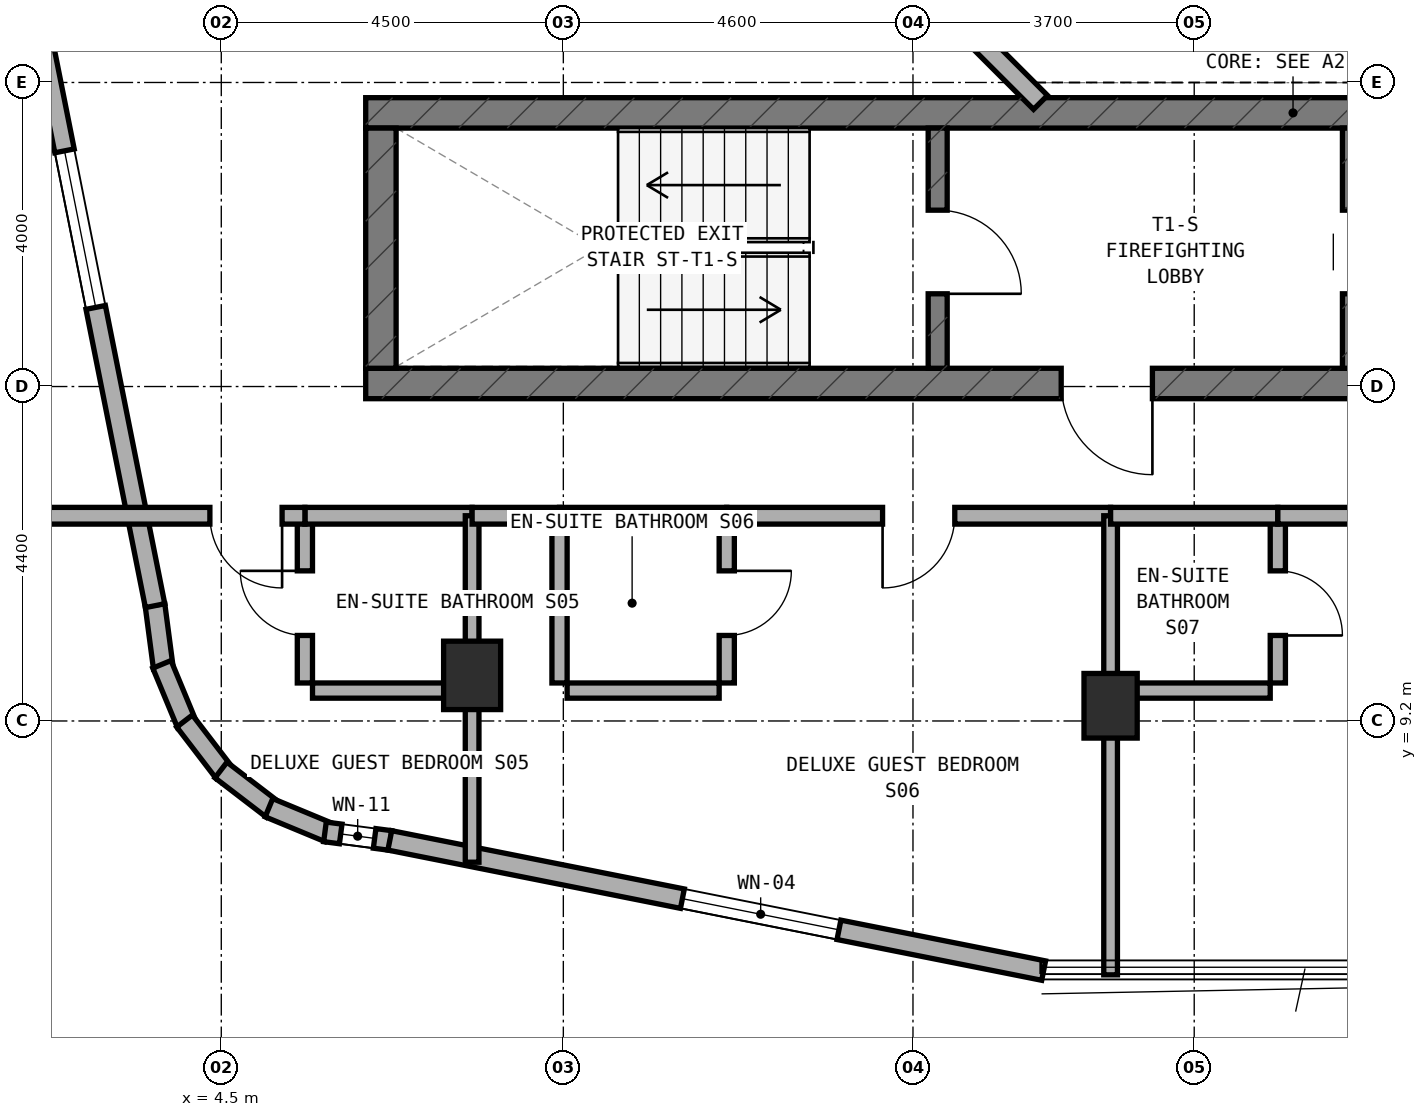
"""IFC4 building model, lengths in metres.
Left out: names, types, materials, properties, quantities, classifications, styles, units other than length and angle.
Written with IfcOpenShell. Run it as: python <this file> out.ifc"""

import sys

from ifc_helpers import new_model, si_unit, direction, frame, frame_2d, origin, origin_2d, place, context, subcontext, project, spatial, rectangle, extrude, element, fill, save


model = new_model("IFC4")
c1 = context("Model", 3, precision=1e-05, world=origin(), true_north=direction((0.0, 1.0)))
c2 = subcontext(c1, "Body", "Model", "MODEL_VIEW")
j1 = project(units=[si_unit("LENGTHUNIT", "METRE"), si_unit("PLANEANGLEUNIT", "RADIAN")], contexts=[c1])
p1 = place(None, origin())
s1 = spatial("IfcSite", under=j1, at=p1, CompositionType="ELEMENT")
p2 = place(p1, origin())
s2 = spatial("IfcBuilding", under=s1, at=p2, CompositionType="ELEMENT")
p3 = place(p2, frame((0.0, 0.0, 224.3)))
s3 = spatial("IfcBuildingStorey", under=s2, at=p3, CompositionType="ELEMENT", Elevation=224.3)
p4 = place(p3, frame((6.4, 13.64, 0.0), z_axis=(0.0, 0.0, 1.0), x_axis=(1.0, 0.0, 0.0)))
e1 = element("IfcWall", 1, at=p4, inside=s3, PredefinedType="SHEAR", context=c2, shape_type="SweptSolid", body=[
    extrude(rectangle(XDim=24.4, YDim=0.4, at=frame_2d((12.2, 0.0))), origin(), (0.0, 0.0, 1.0), 3.6),
])
p5 = place(p4, frame((9.15, 0.0, 0.0)))
e2 = element("IfcOpeningElement", 2, at=p5, cuts=e1, PredefinedType="OPENING", context=c2, shape_type="SweptSolid", body=[
    extrude(rectangle(XDim=1.2, YDim=2.15, at=frame_2d((0.6, 1.075))), frame((0.0, 0.21, 0.0), z_axis=(0.0, -1.0, 0.0), x_axis=(1.0, 0.0, 0.0)), (0.0, 0.0, 1.0), 0.42),
])
p6 = place(p4, frame((16.94, 0.0, 0.0)))
e3 = element("IfcOpeningElement", 3, at=p6, cuts=e1, PredefinedType="OPENING", context=c2, shape_type="SweptSolid", body=[
    extrude(rectangle(XDim=0.85, YDim=2.1, at=frame_2d((0.425, 1.05))), frame((0.0, 0.21, 0.0), z_axis=(0.0, -1.0, 0.0), x_axis=(1.0, 0.0, 0.0)), (0.0, 0.0, 1.0), 0.42),
])
p7 = place(p4, frame((18.783, 0.0, 0.0)))
e4 = element("IfcOpeningElement", 4, at=p7, cuts=e1, PredefinedType="OPENING", context=c2, shape_type="SweptSolid", body=[
    extrude(rectangle(XDim=1.1, YDim=2.15, at=frame_2d((0.55, 1.075))), frame((0.0, 0.21, 0.0), z_axis=(0.0, -1.0, 0.0), x_axis=(1.0, 0.0, 0.0)), (0.0, 0.0, 1.0), 0.42),
])
p8 = place(p4, frame((20.65, 0.0, 0.0)))
e5 = element("IfcOpeningElement", 5, at=p8, cuts=e1, PredefinedType="OPENING", context=c2, shape_type="SweptSolid", body=[
    extrude(rectangle(XDim=1.1, YDim=2.15, at=frame_2d((0.55, 1.075))), frame((0.0, 0.21, 0.0), z_axis=(0.0, -1.0, 0.0), x_axis=(1.0, 0.0, 0.0)), (0.0, 0.0, 1.0), 0.42),
])
p9 = place(p4, frame((22.517, 0.0, 0.0)))
e6 = element("IfcOpeningElement", 6, at=p9, cuts=e1, PredefinedType="OPENING", context=c2, shape_type="SweptSolid", body=[
    extrude(rectangle(XDim=1.1, YDim=2.15, at=frame_2d((0.55, 1.075))), frame((0.0, 0.21, 0.0), z_axis=(0.0, -1.0, 0.0), x_axis=(1.0, 0.0, 0.0)), (0.0, 0.0, 1.0), 0.42),
])
p10 = place(p3, frame((6.4, 17.2, 0.0), z_axis=(0.0, 0.0, 1.0), x_axis=(1.0, 0.0, 0.0)))
e7 = element("IfcWall", 7, at=p10, inside=s3, PredefinedType="SHEAR", context=c2, shape_type="SweptSolid", body=[
    extrude(rectangle(XDim=24.4, YDim=0.4, at=frame_2d((12.2, 0.0))), origin(), (0.0, 0.0, 1.0), 3.6),
])
p11 = place(p3, frame((6.6, 13.84, 0.0), z_axis=(0.0, 0.0, 1.0), x_axis=(0.0, 1.0, 0.0)))
e8 = element("IfcWall", 8, at=p11, inside=s3, PredefinedType="SHEAR", context=c2, shape_type="SweptSolid", body=[
    extrude(rectangle(XDim=3.16, YDim=0.4, at=frame_2d((1.58, 0.0))), origin(), (0.0, 0.0, 1.0), 3.6),
])
p12 = place(p3, frame((13.925, 13.84, 0.0), z_axis=(0.0, 0.0, 1.0), x_axis=(0.0, 1.0, 0.0)))
e9 = element("IfcWall", 9, at=p12, inside=s3, PredefinedType="STANDARD", context=c2, shape_type="SweptSolid", body=[
    extrude(rectangle(XDim=3.16, YDim=0.25, at=frame_2d((1.58, 0.0))), origin(), (0.0, 0.0, 1.0), 3.32),
])
p13 = place(p12, frame((0.98, 0.0, 0.0)))
e10 = element("IfcOpeningElement", 10, at=p13, cuts=e9, PredefinedType="OPENING", context=c2, shape_type="SweptSolid", body=[
    extrude(rectangle(XDim=1.1, YDim=2.15, at=frame_2d((0.55, 1.075))), frame((0.0, 0.135, 0.0), z_axis=(0.0, -1.0, 0.0), x_axis=(1.0, 0.0, 0.0)), (0.0, 0.0, 1.0), 0.27),
])
p14 = place(p3, frame((19.375, 13.84, 0.0), z_axis=(0.0, 0.0, 1.0), x_axis=(0.0, 1.0, 0.0)))
e11 = element("IfcWall", 11, at=p14, inside=s3, PredefinedType="STANDARD", context=c2, shape_type="SweptSolid", body=[
    extrude(rectangle(XDim=3.16, YDim=0.25, at=frame_2d((1.58, 0.0))), origin(), (0.0, 0.0, 1.0), 3.32),
])
p15 = place(p14, frame((0.98, 0.0, 0.0)))
e12 = element("IfcOpeningElement", 12, at=p15, cuts=e11, PredefinedType="OPENING", context=c2, shape_type="SweptSolid", body=[
    extrude(rectangle(XDim=1.1, YDim=2.15, at=frame_2d((0.55, 1.075))), frame((0.0, 0.135, 0.0), z_axis=(0.0, -1.0, 0.0), x_axis=(1.0, 0.0, 0.0)), (0.0, 0.0, 1.0), 0.27),
])
p16 = place(p3, frame((16.2, 9.4, 0.0), z_axis=(0.0, 0.0, 1.0), x_axis=(1.0, 0.0, 0.0)))
e13 = element("IfcColumn", 13, at=p16, inside=s3, PredefinedType="COLUMN", context=c2, shape_type="SweptSolid", body=[
    extrude(rectangle(XDim=0.7, YDim=0.85, at=origin_2d()), origin(), (0.0, 0.0, 1.0), 3.6),
])
p17 = place(p3, frame((7.8, 9.8, 0.0), z_axis=(0.0, 0.0, 1.0), x_axis=(1.0, 0.0, 0.0)))
e14 = element("IfcColumn", 14, at=p17, inside=s3, PredefinedType="COLUMN", context=c2, shape_type="SweptSolid", body=[
    extrude(rectangle(XDim=0.75, YDim=0.9, at=origin_2d()), origin(), (0.0, 0.0, 1.0), 3.6),
])
p18 = place(p3, frame((3.628, 10.725, 0.0), z_axis=(0.0, 0.0, 1.0), x_axis=(0.130954667764, -0.9913883573, 0.0)))
e15 = element("IfcWall", 15, at=p18, inside=s3, PredefinedType="STANDARD", context=c2, shape_type="SweptSolid", body=[
    extrude(rectangle(XDim=0.833, YDim=0.26, at=frame_2d((0.417, 0.0))), origin(), (0.0, 0.0, 1.0), 3.32),
])
p19 = place(p3, frame((3.719, 9.945, 0.0), z_axis=(0.0, 0.0, 1.0), x_axis=(0.382985169477, -0.923754491172, 0.0)))
e16 = element("IfcWall", 16, at=p19, inside=s3, PredefinedType="STANDARD", context=c2, shape_type="SweptSolid", body=[
    extrude(rectangle(XDim=0.851, YDim=0.26, at=frame_2d((0.426, 0.0))), origin(), (0.0, 0.0, 1.0), 3.32),
])
for number, where, z_axis, x_axis in (
    (17, (4.017, 9.199, 0.0), (0.0, 0.0, 1.0), (0.608, -0.794, 0.0)),
    (18, (4.496, 8.555, 0.0), (0.0, 0.0, 1.0), (0.794, -0.608, 0.0)),
):
    element("IfcWall", number, at=place(p3, frame(where, z_axis=z_axis, x_axis=x_axis)), inside=s3, PredefinedType="STANDARD", context=c2, shape_type="SweptSolid", body=[
        extrude(rectangle(XDim=0.85, YDim=0.26, at=frame_2d((0.425, 0.0))), origin(), (0.0, 0.0, 1.0), 3.32),
    ])
p20 = place(p3, frame((5.127, 8.059, 0.0), z_axis=(0.0, 0.0, 1.0), x_axis=(0.923652976167, -0.383229930484, 0.0)))
e19 = element("IfcWall", 19, at=p20, inside=s3, PredefinedType="STANDARD", context=c2, shape_type="SweptSolid", body=[
    extrude(rectangle(XDim=0.851, YDim=0.26, at=frame_2d((0.426, 0.0))), origin(), (0.0, 0.0, 1.0), 3.32),
])
p21 = place(p3, frame((5.864, 7.741, 0.0), z_axis=(0.0, 0.0, 1.0), x_axis=(0.991493480548, -0.130156359936, 0.0)))
e20 = element("IfcWall", 20, at=p21, inside=s3, PredefinedType="STANDARD", context=c2, shape_type="SweptSolid", body=[
    extrude(rectangle(XDim=0.868, YDim=0.26, at=frame_2d((0.434, 0.0))), origin(), (0.0, 0.0, 1.0), 3.32),
])
p22 = place(p21, frame((0.209, 0.0, 0.85)))
e21 = element("IfcOpeningElement", 21, at=p22, cuts=e20, PredefinedType="OPENING", context=c2, shape_type="SweptSolid", body=[
    extrude(rectangle(XDim=0.45, YDim=1.5, at=frame_2d((0.225, 0.75))), frame((0.0, 0.14, 0.0), z_axis=(0.0, -1.0, 0.0), x_axis=(1.0, 0.0, 0.0)), (0.0, 0.0, 1.0), 0.28),
])
p23 = place(p3, frame((6.717, 7.629, 0.0), z_axis=(0.0, 0.0, 1.0), x_axis=(0.980745199176, -0.195291715883, 0.0)))
e22 = element("IfcWall", 22, at=p23, inside=s3, PredefinedType="STANDARD", context=c2, shape_type="SweptSolid", body=[
    extrude(rectangle(XDim=8.771, YDim=0.26, at=frame_2d((4.385, 0.0))), origin(), (0.0, 0.0, 1.0), 3.32),
])
p24 = place(p23, frame((3.925, 0.0, 0.85)))
e23 = element("IfcOpeningElement", 23, at=p24, cuts=e22, PredefinedType="OPENING", context=c2, shape_type="SweptSolid", body=[
    extrude(rectangle(XDim=2.1, YDim=1.5, at=frame_2d((1.05, 0.75))), frame((0.0, 0.14, 0.0), z_axis=(0.0, -1.0, 0.0), x_axis=(1.0, 0.0, 0.0)), (0.0, 0.0, 1.0), 0.28),
])
p25 = place(p3, frame((1.916, 19.319, 0.0), z_axis=(0.0, 0.0, 1.0), x_axis=(0.195291715883, -0.980745199176, 0.0)))
e24 = element("IfcWall", 24, at=p25, inside=s3, PredefinedType="STANDARD", context=c2, shape_type="SweptSolid", body=[
    extrude(rectangle(XDim=8.771, YDim=0.26, at=frame_2d((4.385, 0.0))), origin(), (0.0, 0.0, 1.0), 3.32),
])
p26 = place(p25, frame((2.67, 0.0, 0.85)))
e25 = element("IfcOpeningElement", 25, at=p26, cuts=e24, PredefinedType="OPENING", context=c2, shape_type="SweptSolid", body=[
    extrude(rectangle(XDim=2.1, YDim=1.5, at=frame_2d((1.05, 0.75))), frame((0.0, 0.14, 0.0), z_axis=(0.0, -1.0, 0.0), x_axis=(1.0, 0.0, 0.0)), (0.0, 0.0, 1.0), 0.28),
])
p27 = place(p3, frame((13.444, 19.172, 0.0), z_axis=(0.0, 0.0, 1.0), x_axis=(0.707059717605, -0.707153841636, 0.0)))
e26 = element("IfcWall", 26, at=p27, inside=s3, PredefinedType="STANDARD", context=c2, shape_type="SweptSolid", body=[
    extrude(rectangle(XDim=2.594, YDim=0.26, at=frame_2d((1.297, 0.0))), origin(), (0.0, 0.0, 1.0), 3.32),
])
p28 = place(p3, frame((5.6, 9.7, 0.0), z_axis=(0.0, 0.0, 1.0), x_axis=(0.0, 1.0, 0.0)))
e27 = element("IfcWall", 27, at=p28, inside=s3, PredefinedType="PLUMBINGWALL", context=c2, shape_type="SweptSolid", body=[
    extrude(rectangle(XDim=2.1, YDim=0.2, at=frame_2d((1.05, 0.0))), origin(), (0.0, 0.0, 1.0), 3.32),
])
p29 = place(p28, frame((0.625, 0.0, 0.0)))
e28 = element("IfcOpeningElement", 28, at=p29, cuts=e27, PredefinedType="OPENING", context=c2, shape_type="SweptSolid", body=[
    extrude(rectangle(XDim=0.85, YDim=2.1, at=frame_2d((0.425, 1.05))), frame((0.0, 0.11, 0.0), z_axis=(0.0, -1.0, 0.0), x_axis=(1.0, 0.0, 0.0)), (0.0, 0.0, 1.0), 0.22),
])
p30 = place(p3, frame((5.7, 9.6, 0.0), z_axis=(0.0, 0.0, 1.0), x_axis=(1.0, 0.0, 0.0)))
e29 = element("IfcWall", 29, at=p30, inside=s3, PredefinedType="PLUMBINGWALL", context=c2, shape_type="SweptSolid", body=[
    extrude(rectangle(XDim=2.0, YDim=0.2, at=frame_2d((1.0, 0.0))), origin(), (0.0, 0.0, 1.0), 3.32),
])
p31 = place(p3, frame((5.6, 11.9, 0.0), z_axis=(0.0, 0.0, 1.0), x_axis=(1.0, 0.0, 0.0)))
e30 = element("IfcWall", 30, at=p31, inside=s3, PredefinedType="SOLIDWALL", context=c2, shape_type="SweptSolid", body=[
    extrude(rectangle(XDim=2.2, YDim=0.22, at=frame_2d((1.1, 0.0))), origin(), (0.0, 0.0, 1.0), 2.695),
])
p32 = place(p3, frame((1.96, 11.9, 0.0), z_axis=(0.0, 0.0, 1.0), x_axis=(1.0, 0.0, 0.0)))
e31 = element("IfcWall", 31, at=p32, inside=s3, PredefinedType="SOLIDWALL", context=c2, shape_type="SweptSolid", body=[
    extrude(rectangle(XDim=3.64, YDim=0.22, at=frame_2d((1.82, 0.0))), origin(), (0.0, 0.0, 1.0), 3.32),
])
p33 = place(p32, frame((2.39, 0.0, 0.0)))
e32 = element("IfcOpeningElement", 32, at=p33, cuts=e31, PredefinedType="OPENING", context=c2, shape_type="SweptSolid", body=[
    extrude(rectangle(XDim=0.95, YDim=2.1, at=frame_2d((0.475, 1.05))), frame((0.0, 0.12, 0.0), z_axis=(0.0, -1.0, 0.0), x_axis=(1.0, 0.0, 0.0)), (0.0, 0.0, 1.0), 0.24),
])
p34 = place(p3, frame((7.8, 7.342, 0.0), z_axis=(0.0, 0.0, 1.0), x_axis=(0.0, 1.0, 0.0)))
e33 = element("IfcWall", 33, at=p34, inside=s3, PredefinedType="SOLIDWALL", context=c2, shape_type="SweptSolid", body=[
    extrude(rectangle(XDim=4.558, YDim=0.18, at=frame_2d((2.279, 0.0))), origin(), (0.0, 0.0, 1.0), 2.695),
])
p35 = place(p3, frame((11.15, 9.7, 0.0), z_axis=(0.0, 0.0, 1.0), x_axis=(0.0, 1.0, 0.0)))
e34 = element("IfcWall", 34, at=p35, inside=s3, PredefinedType="PLUMBINGWALL", context=c2, shape_type="SweptSolid", body=[
    extrude(rectangle(XDim=2.1, YDim=0.2, at=frame_2d((1.05, 0.0))), origin(), (0.0, 0.0, 1.0), 3.015),
])
p36 = place(p35, frame((0.625, 0.0, 0.0)))
e35 = element("IfcOpeningElement", 35, at=p36, cuts=e34, PredefinedType="OPENING", context=c2, shape_type="SweptSolid", body=[
    extrude(rectangle(XDim=0.85, YDim=2.1, at=frame_2d((0.425, 1.05))), frame((0.0, 0.11, 0.0), z_axis=(0.0, -1.0, 0.0), x_axis=(1.0, 0.0, 0.0)), (0.0, 0.0, 1.0), 0.22),
])
p37 = place(p3, frame((9.05, 9.6, 0.0), z_axis=(0.0, 0.0, 1.0), x_axis=(1.0, 0.0, 0.0)))
e36 = element("IfcWall", 36, at=p37, inside=s3, PredefinedType="PLUMBINGWALL", context=c2, shape_type="SweptSolid", body=[
    extrude(rectangle(XDim=2.0, YDim=0.2, at=frame_2d((1.0, 0.0))), origin(), (0.0, 0.0, 1.0), 3.015),
])
p38 = place(p3, frame((8.95, 9.7, 0.0), z_axis=(0.0, 0.0, 1.0), x_axis=(0.0, 1.0, 0.0)))
e37 = element("IfcWall", 37, at=p38, inside=s3, PredefinedType="PLUMBINGWALL", context=c2, shape_type="SweptSolid", body=[
    extrude(rectangle(XDim=2.1, YDim=0.2, at=frame_2d((1.05, 0.0))), origin(), (0.0, 0.0, 1.0), 3.015),
])
p39 = place(p3, frame((7.8, 11.9, 0.0), z_axis=(0.0, 0.0, 1.0), x_axis=(1.0, 0.0, 0.0)))
e38 = element("IfcWall", 38, at=p39, inside=s3, PredefinedType="SOLIDWALL", context=c2, shape_type="SweptSolid", body=[
    extrude(rectangle(XDim=1.15, YDim=0.22, at=frame_2d((0.575, 0.0))), origin(), (0.0, 0.0, 1.0), 2.695),
])
p40 = place(p3, frame((8.95, 11.9, 0.0), z_axis=(0.0, 0.0, 1.0), x_axis=(1.0, 0.0, 0.0)))
e39 = element("IfcWall", 39, at=p40, inside=s3, PredefinedType="SOLIDWALL", context=c2, shape_type="SweptSolid", body=[
    extrude(rectangle(XDim=2.2, YDim=0.22, at=frame_2d((1.1, 0.0))), origin(), (0.0, 0.0, 1.0), 3.32),
])
p41 = place(p3, frame((11.15, 11.9, 0.0), z_axis=(0.0, 0.0, 1.0), x_axis=(1.0, 0.0, 0.0)))
e40 = element("IfcWall", 40, at=p41, inside=s3, PredefinedType="SOLIDWALL", context=c2, shape_type="SweptSolid", body=[
    extrude(rectangle(XDim=5.05, YDim=0.22, at=frame_2d((2.525, 0.0))), origin(), (0.0, 0.0, 1.0), 2.695),
])
p42 = place(p41, frame((2.05, 0.0, 0.0)))
e41 = element("IfcOpeningElement", 41, at=p42, cuts=e40, PredefinedType="OPENING", context=c2, shape_type="SweptSolid", body=[
    extrude(rectangle(XDim=0.95, YDim=2.1, at=frame_2d((0.475, 1.05))), frame((0.0, 0.12, 0.0), z_axis=(0.0, -1.0, 0.0), x_axis=(1.0, 0.0, 0.0)), (0.0, 0.0, 1.0), 0.24),
])
p43 = place(p3, frame((16.2, 5.86, 0.0), z_axis=(0.0, 0.0, 1.0), x_axis=(0.0, 1.0, 0.0)))
e42 = element("IfcWall", 42, at=p43, inside=s3, PredefinedType="SOLIDWALL", context=c2, shape_type="SweptSolid", body=[
    extrude(rectangle(XDim=6.04, YDim=0.18, at=frame_2d((3.02, 0.0))), origin(), (0.0, 0.0, 1.0), 2.695),
])
p44 = place(p3, frame((18.4, 9.7, 0.0), z_axis=(0.0, 0.0, 1.0), x_axis=(0.0, 1.0, 0.0)))
e43 = element("IfcWall", 43, at=p44, inside=s3, PredefinedType="PLUMBINGWALL", context=c2, shape_type="SweptSolid", body=[
    extrude(rectangle(XDim=2.1, YDim=0.2, at=frame_2d((1.05, 0.0))), origin(), (0.0, 0.0, 1.0), 3.055),
])
p45 = place(p44, frame((0.625, 0.0, 0.0)))
e44 = element("IfcOpeningElement", 44, at=p45, cuts=e43, PredefinedType="OPENING", context=c2, shape_type="SweptSolid", body=[
    extrude(rectangle(XDim=0.85, YDim=2.1, at=frame_2d((0.425, 1.05))), frame((0.0, 0.11, 0.0), z_axis=(0.0, -1.0, 0.0), x_axis=(1.0, 0.0, 0.0)), (0.0, 0.0, 1.0), 0.22),
])
p46 = place(p3, frame((16.3, 9.6, 0.0), z_axis=(0.0, 0.0, 1.0), x_axis=(1.0, 0.0, 0.0)))
e45 = element("IfcWall", 45, at=p46, inside=s3, PredefinedType="PLUMBINGWALL", context=c2, shape_type="SweptSolid", body=[
    extrude(rectangle(XDim=2.0, YDim=0.2, at=frame_2d((1.0, 0.0))), origin(), (0.0, 0.0, 1.0), 3.015),
])
p47 = place(p3, frame((16.2, 11.9, 0.0), z_axis=(0.0, 0.0, 1.0), x_axis=(1.0, 0.0, 0.0)))
e46 = element("IfcWall", 46, at=p47, inside=s3, PredefinedType="SOLIDWALL", context=c2, shape_type="SweptSolid", body=[
    extrude(rectangle(XDim=2.2, YDim=0.22, at=frame_2d((1.1, 0.0))), origin(), (0.0, 0.0, 1.0), 2.695),
])
p48 = place(p3, frame((18.4, 11.9, 0.0), z_axis=(0.0, 0.0, 1.0), x_axis=(1.0, 0.0, 0.0)))
e47 = element("IfcWall", 47, at=p48, inside=s3, PredefinedType="SOLIDWALL", context=c2, shape_type="SweptSolid", body=[
    extrude(rectangle(XDim=7.4, YDim=0.22, at=frame_2d((3.7, 0.0))), origin(), (0.0, 0.0, 1.0), 2.695),
])
p49 = place(p48, frame((3.225, 0.0, 0.0)))
e48 = element("IfcOpeningElement", 48, at=p49, cuts=e47, PredefinedType="OPENING", context=c2, shape_type="SweptSolid", body=[
    extrude(rectangle(XDim=0.95, YDim=2.1, at=frame_2d((0.475, 1.05))), frame((0.0, 0.12, 0.0), z_axis=(0.0, -1.0, 0.0), x_axis=(1.0, 0.0, 0.0)), (0.0, 0.0, 1.0), 0.24),
])
p50 = place(p24, origin())
e49 = element("IfcWindow", 49, at=p50, inside=s3, PartitioningType="SINGLE_PANEL", PredefinedType="WINDOW", context=c2, shape_type="SweptSolid", body=[
    extrude(rectangle(XDim=2.1, YDim=1.5, at=frame_2d((1.05, 0.75))), frame((0.0, 0.03, 0.0), z_axis=(0.0, -1.0, 0.0), x_axis=(1.0, 0.0, 0.0)), (0.0, 0.0, 1.0), 0.06),
])
fill(e23, e49)
p51 = place(p26, origin())
e50 = element("IfcWindow", 50, at=p51, inside=s3, PartitioningType="SINGLE_PANEL", PredefinedType="WINDOW", context=c2, shape_type="SweptSolid", body=[
    extrude(rectangle(XDim=2.1, YDim=1.5, at=frame_2d((1.05, 0.75))), frame((0.0, 0.03, 0.0), z_axis=(0.0, -1.0, 0.0), x_axis=(1.0, 0.0, 0.0)), (0.0, 0.0, 1.0), 0.06),
])
fill(e25, e50)
p52 = place(p22, origin())
e51 = element("IfcWindow", 51, at=p52, inside=s3, PartitioningType="SINGLE_PANEL", PredefinedType="WINDOW", context=c2, shape_type="SweptSolid", body=[
    extrude(rectangle(XDim=0.45, YDim=1.5, at=frame_2d((0.225, 0.75))), frame((0.0, 0.03, 0.0), z_axis=(0.0, -1.0, 0.0), x_axis=(1.0, 0.0, 0.0)), (0.0, 0.0, 1.0), 0.06),
])
fill(e21, e51)
p53 = place(p13, frame((1.1, 0.0, 0.0), z_axis=(0.0, 0.0, 1.0), x_axis=(-1.0, 0.0, 0.0)))
e52 = element("IfcDoor", 52, at=p53, inside=s3, OperationType="SINGLE_SWING_RIGHT", PredefinedType="DOOR", context=c2, shape_type="SweptSolid", body=[
    extrude(rectangle(XDim=1.1, YDim=2.15, at=frame_2d((0.55, 1.075))), frame((0.0, 0.025, 0.0), z_axis=(0.0, -1.0, 0.0), x_axis=(1.0, 0.0, 0.0)), (0.0, 0.0, 1.0), 0.05),
])
fill(e10, e52)
p54 = place(p5, frame((1.2, 0.0, 0.0), z_axis=(0.0, 0.0, 1.0), x_axis=(-1.0, 0.0, 0.0)))
e53 = element("IfcDoor", 53, at=p54, inside=s3, OperationType="SINGLE_SWING_LEFT", PredefinedType="DOOR", context=c2, shape_type="SweptSolid", body=[
    extrude(rectangle(XDim=1.2, YDim=2.15, at=frame_2d((0.6, 1.075))), frame((0.0, 0.025, 0.0), z_axis=(0.0, -1.0, 0.0), x_axis=(1.0, 0.0, 0.0)), (0.0, 0.0, 1.0), 0.05),
])
fill(e2, e53)
p55 = place(p29, origin())
e54 = element("IfcDoor", 54, at=p55, inside=s3, OperationType="SINGLE_SWING_RIGHT", PredefinedType="DOOR", context=c2, shape_type="SweptSolid", body=[
    extrude(rectangle(XDim=0.85, YDim=2.1, at=frame_2d((0.425, 1.05))), frame((0.0, 0.025, 0.0), z_axis=(0.0, -1.0, 0.0), x_axis=(1.0, 0.0, 0.0)), (0.0, 0.0, 1.0), 0.05),
])
fill(e28, e54)
p56 = place(p33, frame((0.95, 0.0, 0.0), z_axis=(0.0, 0.0, 1.0), x_axis=(-1.0, 0.0, 0.0)))
e55 = element("IfcDoor", 55, at=p56, inside=s3, OperationType="SINGLE_SWING_LEFT", PredefinedType="DOOR", context=c2, shape_type="SweptSolid", body=[
    extrude(rectangle(XDim=0.95, YDim=2.1, at=frame_2d((0.475, 1.05))), frame((0.0, 0.025, 0.0), z_axis=(0.0, -1.0, 0.0), x_axis=(1.0, 0.0, 0.0)), (0.0, 0.0, 1.0), 0.05),
])
fill(e32, e55)
p57 = place(p36, frame((0.85, 0.0, 0.0), z_axis=(0.0, 0.0, 1.0), x_axis=(-1.0, 0.0, 0.0)))
e56 = element("IfcDoor", 56, at=p57, inside=s3, OperationType="SINGLE_SWING_LEFT", PredefinedType="DOOR", context=c2, shape_type="SweptSolid", body=[
    extrude(rectangle(XDim=0.85, YDim=2.1, at=frame_2d((0.425, 1.05))), frame((0.0, 0.025, 0.0), z_axis=(0.0, -1.0, 0.0), x_axis=(1.0, 0.0, 0.0)), (0.0, 0.0, 1.0), 0.05),
])
fill(e35, e56)
p58 = place(p42, frame((0.95, 0.0, 0.0), z_axis=(0.0, 0.0, 1.0), x_axis=(-1.0, 0.0, 0.0)))
e57 = element("IfcDoor", 57, at=p58, inside=s3, OperationType="SINGLE_SWING_RIGHT", PredefinedType="DOOR", context=c2, shape_type="SweptSolid", body=[
    extrude(rectangle(XDim=0.95, YDim=2.1, at=frame_2d((0.475, 1.05))), frame((0.0, 0.025, 0.0), z_axis=(0.0, -1.0, 0.0), x_axis=(1.0, 0.0, 0.0)), (0.0, 0.0, 1.0), 0.05),
])
fill(e41, e57)
p59 = place(p45, frame((0.85, 0.0, 0.0), z_axis=(0.0, 0.0, 1.0), x_axis=(-1.0, 0.0, 0.0)))
e58 = element("IfcDoor", 58, at=p59, inside=s3, OperationType="SINGLE_SWING_RIGHT", PredefinedType="DOOR", context=c2, shape_type="SweptSolid", body=[
    extrude(rectangle(XDim=0.85, YDim=2.1, at=frame_2d((0.425, 1.05))), frame((0.0, 0.025, 0.0), z_axis=(0.0, -1.0, 0.0), x_axis=(1.0, 0.0, 0.0)), (0.0, 0.0, 1.0), 0.05),
])
fill(e44, e58)
save(model, sys.argv[1])
